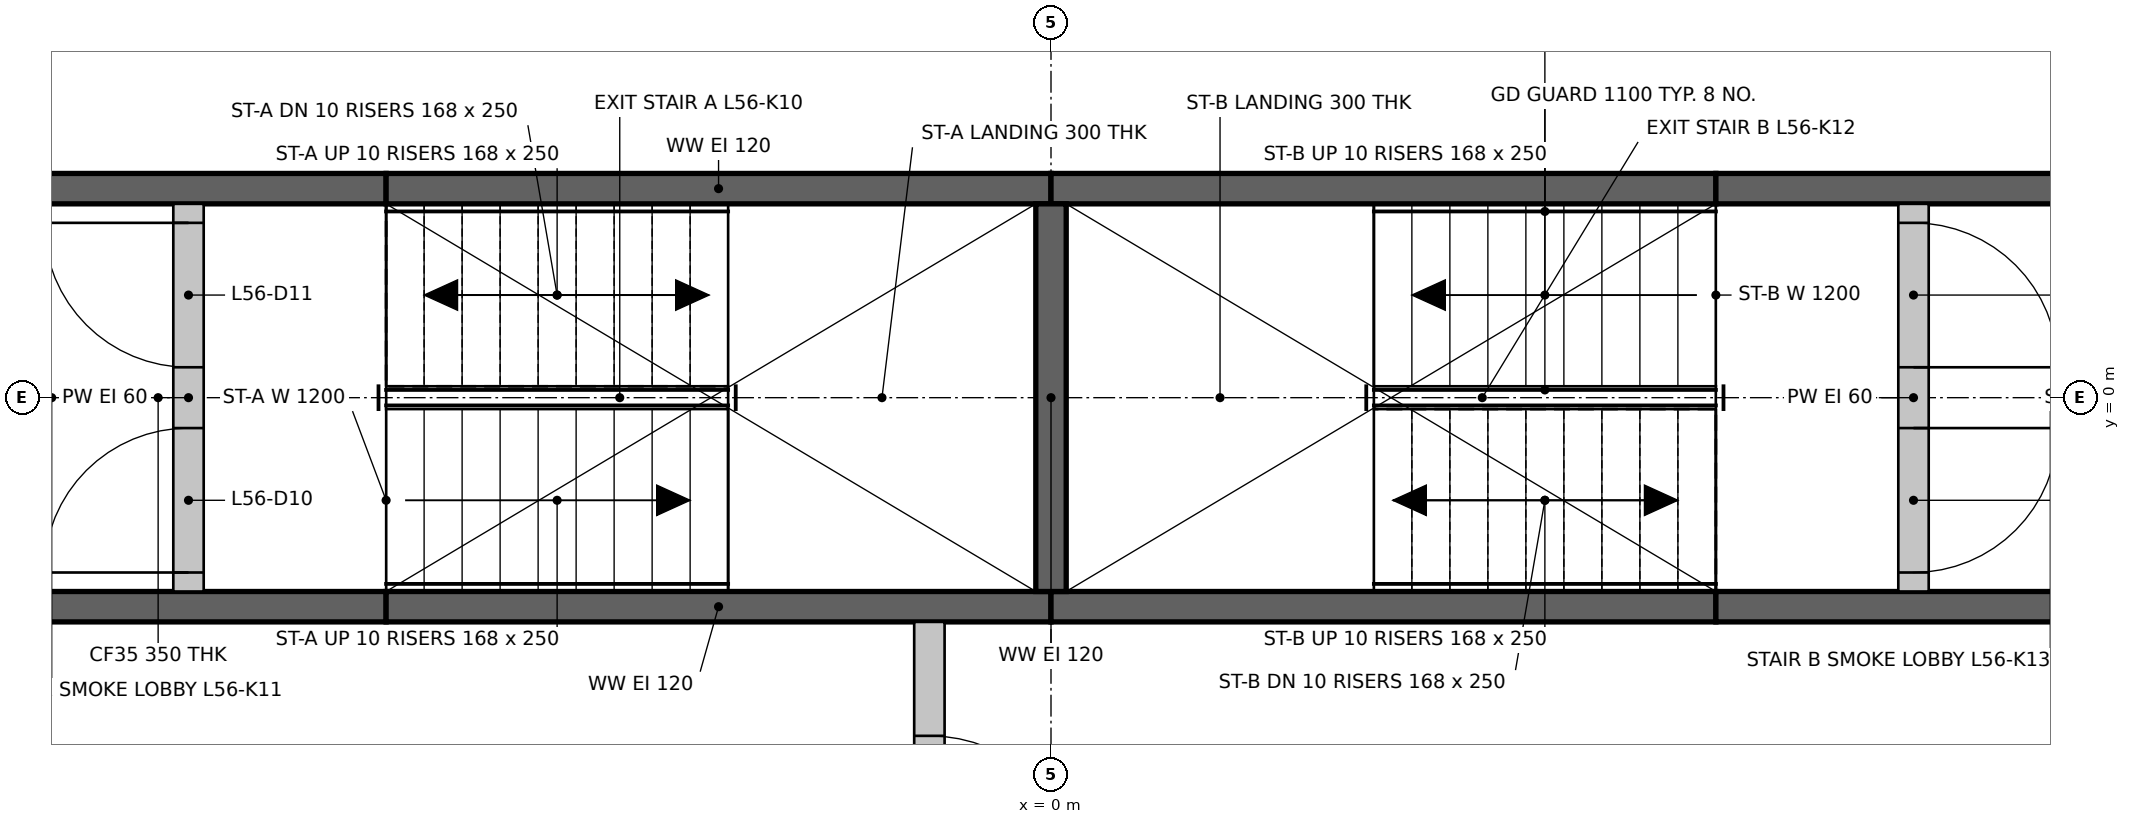
"""IFC4 building model, lengths in metres.
Left out: names, types, materials, properties, quantities, classifications, styles, units other than length and angle.
Written with IfcOpenShell. Run it as: python <this file> out.ifc"""

import sys

from ifc_helpers import new_model, si_unit, direction, frame, frame_2d, origin, place, context, subcontext, project, spatial, rectangle, extrude, element, fill, save


model = new_model("IFC4")
c1 = context("Model", 3, precision=1e-05, world=origin(), true_north=direction((0.0, 1.0)))
c2 = subcontext(c1, "Body", "Model", "MODEL_VIEW")
j1 = project(units=[si_unit("LENGTHUNIT", "METRE"), si_unit("PLANEANGLEUNIT", "RADIAN")], contexts=[c1])
p1 = place(None, origin())
s1 = spatial("IfcSite", under=j1, at=p1, CompositionType="ELEMENT")
p2 = place(p1, origin())
s2 = spatial("IfcBuilding", under=s1, at=p2, CompositionType="ELEMENT")
p3 = place(p2, frame((0.0, 0.0, 211.1)))
s3 = spatial("IfcBuildingStorey", under=s2, at=p3, CompositionType="ELEMENT", Elevation=211.1)
p4 = place(p3, frame((-7.374, -1.375, 0.0), z_axis=(0.0, 0.0, 1.0), x_axis=(1.0, 0.0, 0.0)))
e1 = element("IfcWall", 1, at=p4, inside=s3, PredefinedType="SHEAR", context=c2, shape_type="SweptSolid", body=[
    extrude(rectangle(XDim=3.0, YDim=0.2, at=frame_2d((1.5, 0.0))), origin(), (0.0, 0.0, 1.0), 3.0),
])
for number, where, z_axis, x_axis in (
    (2, (-4.374, -1.375, 0.0), (0.0, 0.0, 1.0), (1.0, 0.0, 0.0)),
    (3, (0.0, -1.375, 0.0), (0.0, 0.0, 1.0), (1.0, 0.0, 0.0)),
):
    element("IfcWall", number, at=place(p3, frame(where, z_axis=z_axis, x_axis=x_axis)), inside=s3, PredefinedType="SHEAR", context=c2, shape_type="SweptSolid", body=[
        extrude(rectangle(XDim=4.374, YDim=0.2, at=frame_2d((2.187, 0.0))), origin(), (0.0, 0.0, 1.0), 3.0),
    ])
for number, where, z_axis, x_axis in (
    (4, (4.374, -1.375, 0.0), (0.0, 0.0, 1.0), (1.0, 0.0, 0.0)),
    (5, (-7.374, 1.375, 0.0), (0.0, 0.0, 1.0), (1.0, 0.0, 0.0)),
):
    element("IfcWall", number, at=place(p3, frame(where, z_axis=z_axis, x_axis=x_axis)), inside=s3, PredefinedType="SHEAR", context=c2, shape_type="SweptSolid", body=[
        extrude(rectangle(XDim=3.0, YDim=0.2, at=frame_2d((1.5, 0.0))), origin(), (0.0, 0.0, 1.0), 3.0),
    ])
for number, where, z_axis, x_axis in (
    (6, (-4.374, 1.375, 0.0), (0.0, 0.0, 1.0), (1.0, 0.0, 0.0)),
    (7, (0.0, 1.375, 0.0), (0.0, 0.0, 1.0), (1.0, 0.0, 0.0)),
):
    element("IfcWall", number, at=place(p3, frame(where, z_axis=z_axis, x_axis=x_axis)), inside=s3, PredefinedType="SHEAR", context=c2, shape_type="SweptSolid", body=[
        extrude(rectangle(XDim=4.374, YDim=0.2, at=frame_2d((2.187, 0.0))), origin(), (0.0, 0.0, 1.0), 3.0),
    ])
p5 = place(p3, frame((4.374, 1.375, 0.0), z_axis=(0.0, 0.0, 1.0), x_axis=(1.0, 0.0, 0.0)))
e8 = element("IfcWall", 8, at=p5, inside=s3, PredefinedType="SHEAR", context=c2, shape_type="SweptSolid", body=[
    extrude(rectangle(XDim=3.0, YDim=0.2, at=frame_2d((1.5, 0.0))), origin(), (0.0, 0.0, 1.0), 3.0),
])
p6 = place(p3, frame((0.0, -1.275, 0.0), z_axis=(0.0, 0.0, 1.0), x_axis=(0.0, 1.0, 0.0)))
e9 = element("IfcWall", 9, at=p6, inside=s3, PredefinedType="SHEAR", context=c2, shape_type="SweptSolid", body=[
    extrude(rectangle(XDim=2.55, YDim=0.2, at=frame_2d((1.275, 0.0))), origin(), (0.0, 0.0, 1.0), 3.0),
])
p7 = place(p3, frame((-0.8, -3.974, 0.0), z_axis=(0.0, 0.0, 1.0), x_axis=(0.0, 1.0, 0.0)))
e10 = element("IfcWall", 10, at=p7, inside=s3, PredefinedType="PARTITIONING", context=c2, shape_type="SweptSolid", body=[
    extrude(rectangle(XDim=2.499, YDim=0.2, at=frame_2d((1.25, 0.0))), origin(), (0.0, 0.0, 1.0), 3.0),
])
p8 = place(p7, frame((0.75, 0.0, 0.0)))
e11 = element("IfcOpeningElement", 11, at=p8, cuts=e10, PredefinedType="OPENING", context=c2, shape_type="SweptSolid", body=[
    extrude(rectangle(XDim=1.0, YDim=2.1, at=frame_2d((0.5, 1.05))), frame((0.0, 0.11, 0.0), z_axis=(0.0, -1.0, 0.0), x_axis=(1.0, 0.0, 0.0)), (0.0, 0.0, 1.0), 0.22),
])
p9 = place(p3, frame((-5.674, -1.275, 0.0), z_axis=(0.0, 0.0, 1.0), x_axis=(0.0, 1.0, 0.0)))
e12 = element("IfcWall", 12, at=p9, inside=s3, PredefinedType="PARTITIONING", context=c2, shape_type="SweptSolid", body=[
    extrude(rectangle(XDim=2.55, YDim=0.2, at=frame_2d((1.275, 0.0))), origin(), (0.0, 0.0, 1.0), 3.0),
])
p10 = place(p9, frame((0.125, 0.0, 0.0)))
e13 = element("IfcOpeningElement", 13, at=p10, cuts=e12, PredefinedType="OPENING", context=c2, shape_type="SweptSolid", body=[
    extrude(rectangle(XDim=0.95, YDim=2.1, at=frame_2d((0.475, 1.05))), frame((0.0, 0.11, 0.0), z_axis=(0.0, -1.0, 0.0), x_axis=(1.0, 0.0, 0.0)), (0.0, 0.0, 1.0), 0.22),
])
p11 = place(p9, frame((1.475, 0.0, 0.0)))
e14 = element("IfcOpeningElement", 14, at=p11, cuts=e12, PredefinedType="OPENING", context=c2, shape_type="SweptSolid", body=[
    extrude(rectangle(XDim=0.95, YDim=2.1, at=frame_2d((0.475, 1.05))), frame((0.0, 0.11, 0.0), z_axis=(0.0, -1.0, 0.0), x_axis=(1.0, 0.0, 0.0)), (0.0, 0.0, 1.0), 0.22),
])
p12 = place(p3, frame((5.674, -1.275, 0.0), z_axis=(0.0, 0.0, 1.0), x_axis=(0.0, 1.0, 0.0)))
e15 = element("IfcWall", 15, at=p12, inside=s3, PredefinedType="PARTITIONING", context=c2, shape_type="SweptSolid", body=[
    extrude(rectangle(XDim=2.55, YDim=0.2, at=frame_2d((1.275, 0.0))), origin(), (0.0, 0.0, 1.0), 3.0),
])
p13 = place(p12, frame((0.125, 0.0, 0.0)))
e16 = element("IfcOpeningElement", 16, at=p13, cuts=e15, PredefinedType="OPENING", context=c2, shape_type="SweptSolid", body=[
    extrude(rectangle(XDim=0.95, YDim=2.1, at=frame_2d((0.475, 1.05))), frame((0.0, 0.11, 0.0), z_axis=(0.0, -1.0, 0.0), x_axis=(1.0, 0.0, 0.0)), (0.0, 0.0, 1.0), 0.22),
])
p14 = place(p12, frame((1.475, 0.0, 0.0)))
e17 = element("IfcOpeningElement", 17, at=p14, cuts=e15, PredefinedType="OPENING", context=c2, shape_type="SweptSolid", body=[
    extrude(rectangle(XDim=0.95, YDim=2.1, at=frame_2d((0.475, 1.05))), frame((0.0, 0.11, 0.0), z_axis=(0.0, -1.0, 0.0), x_axis=(1.0, 0.0, 0.0)), (0.0, 0.0, 1.0), 0.22),
])
p15 = place(p10, origin())
e18 = element("IfcDoor", 18, at=p15, inside=s3, OperationType="SINGLE_SWING_LEFT", PredefinedType="DOOR", context=c2, shape_type="SweptSolid", body=[
    extrude(rectangle(XDim=0.95, YDim=2.1, at=frame_2d((0.475, 1.05))), frame((0.0, 0.025, 0.0), z_axis=(0.0, -1.0, 0.0), x_axis=(1.0, 0.0, 0.0)), (0.0, 0.0, 1.0), 0.05),
])
fill(e13, e18)
p16 = place(p11, origin())
e19 = element("IfcDoor", 19, at=p16, inside=s3, OperationType="SINGLE_SWING_RIGHT", PredefinedType="DOOR", context=c2, shape_type="SweptSolid", body=[
    extrude(rectangle(XDim=0.95, YDim=2.1, at=frame_2d((0.475, 1.05))), frame((0.0, 0.025, 0.0), z_axis=(0.0, -1.0, 0.0), x_axis=(1.0, 0.0, 0.0)), (0.0, 0.0, 1.0), 0.05),
])
fill(e14, e19)
p17 = place(p13, frame((0.95, 0.0, 0.0), z_axis=(0.0, 0.0, 1.0), x_axis=(-1.0, 0.0, 0.0)))
e20 = element("IfcDoor", 20, at=p17, inside=s3, OperationType="SINGLE_SWING_RIGHT", PredefinedType="DOOR", context=c2, shape_type="SweptSolid", body=[
    extrude(rectangle(XDim=0.95, YDim=2.1, at=frame_2d((0.475, 1.05))), frame((0.0, 0.025, 0.0), z_axis=(0.0, -1.0, 0.0), x_axis=(1.0, 0.0, 0.0)), (0.0, 0.0, 1.0), 0.05),
])
fill(e16, e20)
p18 = place(p14, frame((0.95, 0.0, 0.0), z_axis=(0.0, 0.0, 1.0), x_axis=(-1.0, 0.0, 0.0)))
e21 = element("IfcDoor", 21, at=p18, inside=s3, OperationType="SINGLE_SWING_LEFT", PredefinedType="DOOR", context=c2, shape_type="SweptSolid", body=[
    extrude(rectangle(XDim=0.95, YDim=2.1, at=frame_2d((0.475, 1.05))), frame((0.0, 0.025, 0.0), z_axis=(0.0, -1.0, 0.0), x_axis=(1.0, 0.0, 0.0)), (0.0, 0.0, 1.0), 0.05),
])
fill(e17, e21)
p19 = place(p8, frame((1.0, 0.0, 0.0), z_axis=(0.0, 0.0, 1.0), x_axis=(-1.0, 0.0, 0.0)))
e22 = element("IfcDoor", 22, at=p19, inside=s3, OperationType="SINGLE_SWING_LEFT", PredefinedType="DOOR", context=c2, shape_type="SweptSolid", body=[
    extrude(rectangle(XDim=1.0, YDim=2.1, at=frame_2d((0.5, 1.05))), frame((0.0, 0.025, 0.0), z_axis=(0.0, -1.0, 0.0), x_axis=(1.0, 0.0, 0.0)), (0.0, 0.0, 1.0), 0.05),
])
fill(e11, e22)
save(model, sys.argv[1])
